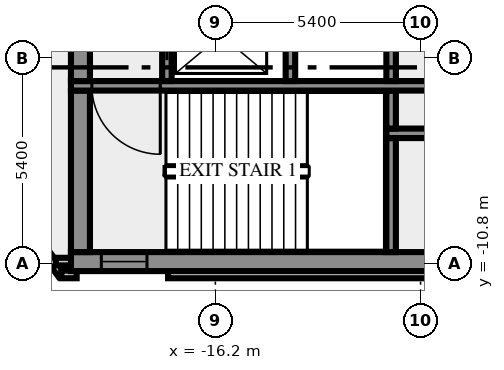
"""IFC4 building model, lengths in metres.
Left out: names, types, materials, properties, quantities, classifications, styles, units other than length and angle.
Written with IfcOpenShell. Run it as: python <this file> out.ifc"""

import sys

from ifc_helpers import new_model, si_unit, direction, frame, frame_2d, origin, place, context, subcontext, project, spatial, rectangle, extrude, element, fill, save


model = new_model("IFC4")
c1 = context("Model", 3, precision=1e-05, world=origin(), true_north=direction((0.0, 1.0)))
c2 = subcontext(c1, "Body", "Model", "MODEL_VIEW")
j1 = project(units=[si_unit("LENGTHUNIT", "METRE"), si_unit("PLANEANGLEUNIT", "RADIAN")], contexts=[c1])
p1 = place(None, origin())
s1 = spatial("IfcSite", under=j1, at=p1, CompositionType="ELEMENT")
p2 = place(p1, origin())
s2 = spatial("IfcBuilding", under=s1, at=p2, CompositionType="ELEMENT")
p3 = place(p2, frame((0.0, 0.0, 172.0)))
s3 = spatial("IfcBuildingStorey", under=s2, at=p3, CompositionType="ELEMENT", Elevation=172.0)
p4 = place(p3, frame((-21.833, -8.909, 0.0), z_axis=(0.0, 0.0, 1.0), x_axis=(0.587766567315, -0.809030569476, 0.0)))
e1 = element("IfcWall", 1, at=p4, inside=s3, PredefinedType="SOLIDWALL", context=c2, shape_type="SweptSolid", body=[
    extrude(rectangle(XDim=2.688, YDim=0.2, at=frame_2d((1.344, 0.0))), origin(), (0.0, 0.0, 1.0), 3.65),
])
p5 = place(p3, frame((-20.256, -11.088, 0.0), z_axis=(0.0, 0.0, 1.0), x_axis=(1.0, 0.0, 0.0)))
e2 = element("IfcWall", 2, at=p5, inside=s3, PredefinedType="SOLIDWALL", context=c2, shape_type="SweptSolid", body=[
    extrude(rectangle(XDim=0.406, YDim=0.2, at=frame_2d((0.203, 0.0))), origin(), (0.0, 0.0, 1.0), 3.65),
])
p6 = place(p3, frame((-17.444, -11.088, 0.0), z_axis=(0.0, 0.0, 1.0), x_axis=(1.0, 0.0, 0.0)))
e3 = element("IfcWall", 3, at=p6, inside=s3, PredefinedType="SOLIDWALL", context=c2, shape_type="SweptSolid", body=[
    extrude(rectangle(XDim=34.888, YDim=0.2, at=frame_2d((17.444, 0.0))), origin(), (0.0, 0.0, 1.0), 3.65),
])
p7 = place(p3, frame((-19.98, -10.75, 0.0), z_axis=(0.0, 0.0, 1.0), x_axis=(-1.0, 0.0, 0.0)))
e4 = element("IfcWall", 4, at=p7, inside=s3, PredefinedType="SOLIDWALL", context=c2, shape_type="SweptSolid", body=[
    extrude(rectangle(XDim=0.417, YDim=0.2, at=frame_2d((0.208, 0.0))), origin(), (0.0, 0.0, 1.0), 3.65),
])
p8 = place(p3, frame((-20.0, -10.75, 0.0), z_axis=(0.0, 0.0, 1.0), x_axis=(1.0, 0.0, 0.0)))
e5 = element("IfcWall", 5, at=p8, inside=s3, PredefinedType="SHEAR", context=c2, shape_type="SweptSolid", body=[
    extrude(rectangle(XDim=40.0, YDim=0.5, at=frame_2d((20.0, 0.0))), origin(), (0.0, 0.0, 1.0), 3.65),
])
p9 = place(p8, frame((0.8, 0.0, 1.0)))
e6 = element("IfcOpeningElement", 6, at=p9, cuts=e5, PredefinedType="OPENING", context=c2, shape_type="SweptSolid", body=[
    extrude(rectangle(XDim=1.2, YDim=1.2, at=frame_2d((0.6, 0.6))), frame((0.0, 0.26, 0.0), z_axis=(0.0, -1.0, 0.0), x_axis=(1.0, 0.0, 0.0)), (0.0, 0.0, 1.0), 0.52),
])
p10 = place(p8, frame((38.0, 0.0, 1.0)))
e7 = element("IfcOpeningElement", 7, at=p10, cuts=e5, PredefinedType="OPENING", context=c2, shape_type="SweptSolid", body=[
    extrude(rectangle(XDim=1.2, YDim=1.2, at=frame_2d((0.6, 0.6))), frame((0.0, 0.26, 0.0), z_axis=(0.0, -1.0, 0.0), x_axis=(1.0, 0.0, 0.0)), (0.0, 0.0, 1.0), 0.52),
])
p11 = place(p3, frame((-19.75, -10.5, 0.0), z_axis=(0.0, 0.0, 1.0), x_axis=(0.0, 1.0, 0.0)))
e8 = element("IfcWall", 8, at=p11, inside=s3, PredefinedType="SHEAR", context=c2, shape_type="SweptSolid", body=[
    extrude(rectangle(XDim=4.25, YDim=0.5, at=frame_2d((2.125, 0.0))), origin(), (0.0, 0.0, 1.0), 3.65),
])
p12 = place(p3, frame((-11.575, -10.5, 0.0), z_axis=(0.0, 0.0, 1.0), x_axis=(0.0, 1.0, 0.0)))
e9 = element("IfcWall", 9, at=p12, inside=s3, PredefinedType="SHEAR", context=c2, shape_type="SweptSolid", body=[
    extrude(rectangle(XDim=3.0, YDim=0.25, at=frame_2d((1.5, 0.0))), origin(), (0.0, 0.0, 1.0), 3.65),
])
p13 = place(p3, frame((11.7, -7.375, 0.0), z_axis=(0.0, 0.0, 1.0), x_axis=(-1.0, 0.0, 0.0)))
e10 = element("IfcWall", 10, at=p13, inside=s3, PredefinedType="SHEAR", context=c2, shape_type="SweptSolid", body=[
    extrude(rectangle(XDim=23.4, YDim=0.25, at=frame_2d((11.7, 0.0))), origin(), (0.0, 0.0, 1.0), 3.65),
])
p14 = place(p13, frame((20.213, 0.0, 0.0)))
e11 = element("IfcOpeningElement", 11, at=p14, cuts=e10, PredefinedType="OPENING", context=c2, shape_type="SweptSolid", body=[
    extrude(rectangle(XDim=0.9, YDim=2.1, at=frame_2d((0.45, 1.05))), frame((0.0, 0.135, 0.0), z_axis=(0.0, -1.0, 0.0), x_axis=(1.0, 0.0, 0.0)), (0.0, 0.0, 1.0), 0.27),
])
p15 = place(p13, frame((16.488, 0.0, 0.0)))
e12 = element("IfcOpeningElement", 12, at=p15, cuts=e10, PredefinedType="OPENING", context=c2, shape_type="SweptSolid", body=[
    extrude(rectangle(XDim=0.9, YDim=2.1, at=frame_2d((0.45, 1.05))), frame((0.0, 0.135, 0.0), z_axis=(0.0, -1.0, 0.0), x_axis=(1.0, 0.0, 0.0)), (0.0, 0.0, 1.0), 0.27),
])
p16 = place(p13, frame((14.45, 0.0, 0.0)))
e13 = element("IfcOpeningElement", 13, at=p16, cuts=e10, PredefinedType="OPENING", context=c2, shape_type="SweptSolid", body=[
    extrude(rectangle(XDim=0.9, YDim=2.1, at=frame_2d((0.45, 1.05))), frame((0.0, 0.135, 0.0), z_axis=(0.0, -1.0, 0.0), x_axis=(1.0, 0.0, 0.0)), (0.0, 0.0, 1.0), 0.27),
])
p17 = place(p13, frame((12.95, 0.0, 0.0)))
e14 = element("IfcOpeningElement", 14, at=p17, cuts=e10, PredefinedType="OPENING", context=c2, shape_type="SweptSolid", body=[
    extrude(rectangle(XDim=0.9, YDim=2.1, at=frame_2d((0.45, 1.05))), frame((0.0, 0.135, 0.0), z_axis=(0.0, -1.0, 0.0), x_axis=(1.0, 0.0, 0.0)), (0.0, 0.0, 1.0), 0.27),
])
p18 = place(p13, frame((11.475, 0.0, 0.0)))
e15 = element("IfcOpeningElement", 15, at=p18, cuts=e10, PredefinedType="OPENING", context=c2, shape_type="SweptSolid", body=[
    extrude(rectangle(XDim=0.9, YDim=2.1, at=frame_2d((0.45, 1.05))), frame((0.0, 0.135, 0.0), z_axis=(0.0, -1.0, 0.0), x_axis=(1.0, 0.0, 0.0)), (0.0, 0.0, 1.0), 0.27),
])
p19 = place(p13, frame((10.45, 0.0, 0.0)))
e16 = element("IfcOpeningElement", 16, at=p19, cuts=e10, PredefinedType="OPENING", context=c2, shape_type="SweptSolid", body=[
    extrude(rectangle(XDim=0.5, YDim=2.1, at=frame_2d((0.25, 1.05))), frame((0.0, 0.135, 0.0), z_axis=(0.0, -1.0, 0.0), x_axis=(1.0, 0.0, 0.0)), (0.0, 0.0, 1.0), 0.27),
])
p20 = place(p13, frame((8.35, 0.0, 0.0)))
e17 = element("IfcOpeningElement", 17, at=p20, cuts=e10, PredefinedType="OPENING", context=c2, shape_type="SweptSolid", body=[
    extrude(rectangle(XDim=1.1, YDim=2.1, at=frame_2d((0.55, 1.05))), frame((0.0, 0.135, 0.0), z_axis=(0.0, -1.0, 0.0), x_axis=(1.0, 0.0, 0.0)), (0.0, 0.0, 1.0), 0.27),
])
p21 = place(p13, frame((5.85, 0.0, 0.0)))
e18 = element("IfcOpeningElement", 18, at=p21, cuts=e10, PredefinedType="OPENING", context=c2, shape_type="SweptSolid", body=[
    extrude(rectangle(XDim=1.1, YDim=2.1, at=frame_2d((0.55, 1.05))), frame((0.0, 0.135, 0.0), z_axis=(0.0, -1.0, 0.0), x_axis=(1.0, 0.0, 0.0)), (0.0, 0.0, 1.0), 0.27),
])
p22 = place(p13, frame((3.35, 0.0, 0.0)))
e19 = element("IfcOpeningElement", 19, at=p22, cuts=e10, PredefinedType="OPENING", context=c2, shape_type="SweptSolid", body=[
    extrude(rectangle(XDim=1.1, YDim=2.1, at=frame_2d((0.55, 1.05))), frame((0.0, 0.135, 0.0), z_axis=(0.0, -1.0, 0.0), x_axis=(1.0, 0.0, 0.0)), (0.0, 0.0, 1.0), 0.27),
])
p23 = place(p13, frame((0.85, 0.0, 0.0)))
e20 = element("IfcOpeningElement", 20, at=p23, cuts=e10, PredefinedType="OPENING", context=c2, shape_type="SweptSolid", body=[
    extrude(rectangle(XDim=1.1, YDim=2.1, at=frame_2d((0.55, 1.05))), frame((0.0, 0.135, 0.0), z_axis=(0.0, -1.0, 0.0), x_axis=(1.0, 0.0, 0.0)), (0.0, 0.0, 1.0), 0.27),
])
p24 = place(p3, frame((-11.575, -7.25, 0.0), z_axis=(0.0, 0.0, 1.0), x_axis=(0.0, 1.0, 0.0)))
e21 = element("IfcWall", 21, at=p24, inside=s3, PredefinedType="SHEAR", context=c2, shape_type="SweptSolid", body=[
    extrude(rectangle(XDim=1.0, YDim=0.25, at=frame_2d((0.5, 0.0))), origin(), (0.0, 0.0, 1.0), 3.65),
])
p25 = place(p3, frame((-9.8, -6.125, 0.0), z_axis=(0.0, 0.0, 1.0), x_axis=(-1.0, 0.0, 0.0)))
e22 = element("IfcWall", 22, at=p25, inside=s3, PredefinedType="SHEAR", context=c2, shape_type="SweptSolid", body=[
    extrude(rectangle(XDim=10.2, YDim=0.25, at=frame_2d((5.1, 0.0))), origin(), (0.0, 0.0, 1.0), 3.65),
])
p26 = place(p25, frame((7.85, 0.0, 0.0)))
e23 = element("IfcOpeningElement", 23, at=p26, cuts=e22, PredefinedType="OPENING", context=c2, shape_type="SweptSolid", body=[
    extrude(rectangle(XDim=1.8, YDim=2.1, at=frame_2d((0.9, 1.05))), frame((0.0, 0.135, 0.0), z_axis=(0.0, -1.0, 0.0), x_axis=(1.0, 0.0, 0.0)), (0.0, 0.0, 1.0), 0.27),
])
p27 = place(p3, frame((-19.75, -6.0, 0.0), z_axis=(0.0, 0.0, 1.0), x_axis=(0.0, 1.0, 0.0)))
e24 = element("IfcWall", 24, at=p27, inside=s3, PredefinedType="SHEAR", context=c2, shape_type="SweptSolid", body=[
    extrude(rectangle(XDim=4.3, YDim=0.5, at=frame_2d((2.15, 0.0))), origin(), (0.0, 0.0, 1.0), 3.65),
])
p28 = place(p3, frame((-17.475, -6.0, 0.0), z_axis=(0.0, 0.0, 1.0), x_axis=(0.0, 1.0, 0.0)))
e25 = element("IfcWall", 25, at=p28, inside=s3, PredefinedType="SHEAR", context=c2, shape_type="SweptSolid", body=[
    extrude(rectangle(XDim=4.3, YDim=0.25, at=frame_2d((2.15, 0.0))), origin(), (0.0, 0.0, 1.0), 3.65),
])
p29 = place(p28, frame((0.55, 0.0, 0.0)))
e26 = element("IfcOpeningElement", 26, at=p29, cuts=e25, PredefinedType="OPENING", context=c2, shape_type="SweptSolid", body=[
    extrude(rectangle(XDim=1.3, YDim=2.1, at=frame_2d((0.65, 1.05))), frame((0.0, 0.135, 0.0), z_axis=(0.0, -1.0, 0.0), x_axis=(1.0, 0.0, 0.0)), (0.0, 0.0, 1.0), 0.27),
])
for number, where, z_axis, x_axis in (
    (27, (-14.225, -6.0, 0.0), (0.0, 0.0, 1.0), (0.0, 1.0, 0.0)),
    (28, (-11.575, -6.0, 0.0), (0.0, 0.0, 1.0), (0.0, 1.0, 0.0)),
):
    element("IfcWall", number, at=place(p3, frame(where, z_axis=z_axis, x_axis=x_axis)), inside=s3, PredefinedType="SHEAR", context=c2, shape_type="SweptSolid", body=[
        extrude(rectangle(XDim=1.75, YDim=0.25, at=frame_2d((0.875, 0.0))), origin(), (0.0, 0.0, 1.0), 3.65),
    ])
p30 = place(p9, origin())
e29 = element("IfcWindow", 29, at=p30, inside=s3, PartitioningType="SINGLE_PANEL", PredefinedType="WINDOW", context=c2, shape_type="SweptSolid", body=[
    extrude(rectangle(XDim=1.2, YDim=1.2, at=frame_2d((0.6, 0.6))), frame((0.0, 0.03, 0.0), z_axis=(0.0, -1.0, 0.0), x_axis=(1.0, 0.0, 0.0)), (0.0, 0.0, 1.0), 0.06),
])
fill(e6, e29)
p31 = place(p26, origin())
e30 = element("IfcDoor", 30, at=p31, inside=s3, OperationType="DOUBLE_DOOR_SINGLE_SWING", PredefinedType="DOOR", context=c2, shape_type="SweptSolid", body=[
    extrude(rectangle(XDim=1.8, YDim=2.1, at=frame_2d((0.9, 1.05))), frame((0.0, 0.025, 0.0), z_axis=(0.0, -1.0, 0.0), x_axis=(1.0, 0.0, 0.0)), (0.0, 0.0, 1.0), 0.05),
])
fill(e23, e30)
p32 = place(p29, origin())
e31 = element("IfcDoor", 31, at=p32, inside=s3, OperationType="DOUBLE_DOOR_SLIDING", PredefinedType="DOOR", context=c2, shape_type="SweptSolid", body=[
    extrude(rectangle(XDim=1.3, YDim=2.1, at=frame_2d((0.65, 1.05))), frame((0.0, 0.025, 0.0), z_axis=(0.0, -1.0, 0.0), x_axis=(1.0, 0.0, 0.0)), (0.0, 0.0, 1.0), 0.05),
])
fill(e26, e31)
save(model, sys.argv[1])
